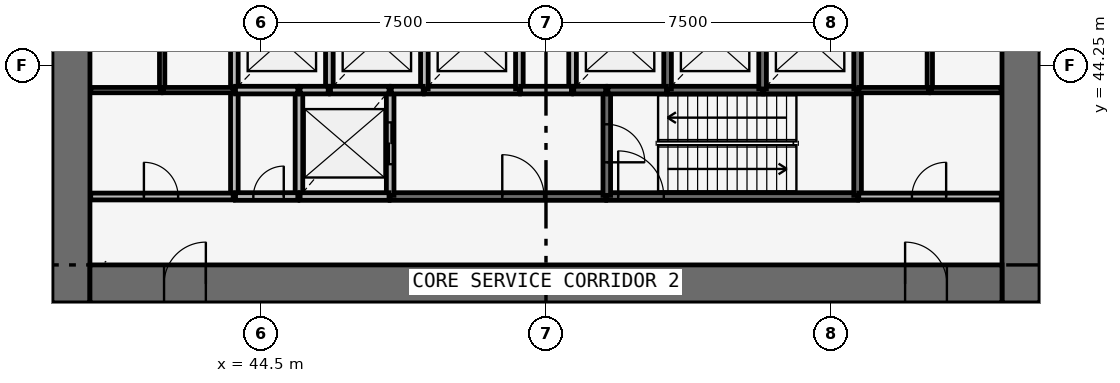
"""IFC4 building model, lengths in metres.
Left out: names, types, materials, properties, quantities, classifications, styles, units other than length and angle.
Written with IfcOpenShell. Run it as: python <this file> out.ifc"""

import sys

from ifc_helpers import new_model, si_unit, direction, frame, frame_2d, origin, place, context, subcontext, project, spatial, rectangle, extrude, source, transform, mapped, element, fill, save


model = new_model("IFC4")
c1 = context("Model", 3, precision=1e-05, world=origin(), true_north=direction((0.0, 1.0)))
c2 = subcontext(c1, "Body", "Model", "MODEL_VIEW")
j1 = project(units=[si_unit("LENGTHUNIT", "METRE"), si_unit("PLANEANGLEUNIT", "RADIAN")], contexts=[c1])
p1 = place(None, origin())
s1 = spatial("IfcSite", under=j1, at=p1, CompositionType="ELEMENT")
p2 = place(p1, origin())
s2 = spatial("IfcBuilding", under=s1, at=p2, CompositionType="ELEMENT")
p3 = place(p2, origin())
s3 = spatial("IfcBuildingStorey", under=s2, at=p3, CompositionType="ELEMENT", Elevation=0.0)
p4 = place(p3, frame((64.5, 38.0, -0.35), z_axis=(0.0, 0.0, 1.0), x_axis=(0.0, 1.0, 0.0)))
e1 = element("IfcWall", 1, at=p4, inside=s3, PredefinedType="SHEAR", context=c2, shape_type="SweptSolid", body=[
    extrude(rectangle(XDim=20.0, YDim=1.0, at=frame_2d((10.0, 0.0))), origin(), (0.0, 0.0, 1.0), 5.35),
])
p5 = place(p4, frame((9.1, 0.0, 0.35)))
e2 = element("IfcOpeningElement", 2, at=p5, cuts=e1, PredefinedType="OPENING", context=c2, shape_type="SweptSolid", body=[
    extrude(rectangle(XDim=1.8, YDim=2.1, at=frame_2d((0.9, 1.05))), frame((0.0, 0.51, 0.0), z_axis=(0.0, -1.0, 0.0), x_axis=(1.0, 0.0, 0.0)), (0.0, 0.0, 1.0), 1.02),
])
p6 = place(p3, frame((39.5, 58.0, -0.35), z_axis=(0.0, 0.0, 1.0), x_axis=(0.0, -1.0, 0.0)))
e3 = element("IfcWall", 3, at=p6, inside=s3, PredefinedType="SHEAR", context=c2, shape_type="SweptSolid", body=[
    extrude(rectangle(XDim=20.0, YDim=1.0, at=frame_2d((10.0, 0.0))), origin(), (0.0, 0.0, 1.0), 5.35),
])
p7 = place(p6, frame((9.1, 0.0, 0.35)))
e4 = element("IfcOpeningElement", 4, at=p7, cuts=e3, PredefinedType="OPENING", context=c2, shape_type="SweptSolid", body=[
    extrude(rectangle(XDim=1.8, YDim=2.1, at=frame_2d((0.9, 1.05))), frame((0.0, 0.51, 0.0), z_axis=(0.0, -1.0, 0.0), x_axis=(1.0, 0.0, 0.0)), (0.0, 0.0, 1.0), 1.02),
])
p8 = place(p3, frame((40.0, 38.5, -0.35), z_axis=(0.0, 0.0, 1.0), x_axis=(1.0, 0.0, 0.0)))
e5 = element("IfcWall", 5, at=p8, inside=s3, PredefinedType="SHEAR", context=c2, shape_type="SweptSolid", body=[
    extrude(rectangle(XDim=24.0, YDim=1.0, at=frame_2d((12.0, 0.0))), origin(), (0.0, 0.0, 1.0), 5.35),
])
p9 = place(p8, frame((21.45, 0.0, 0.35)))
e6 = element("IfcOpeningElement", 6, at=p9, cuts=e5, PredefinedType="OPENING", context=c2, shape_type="SweptSolid", body=[
    extrude(rectangle(XDim=1.1, YDim=2.1, at=frame_2d((0.55, 1.05))), frame((0.0, 0.51, 0.0), z_axis=(0.0, -1.0, 0.0), x_axis=(1.0, 0.0, 0.0)), (0.0, 0.0, 1.0), 1.02),
])
p10 = place(p8, frame((1.95, 0.0, 0.35)))
e7 = element("IfcOpeningElement", 7, at=p10, cuts=e5, PredefinedType="OPENING", context=c2, shape_type="SweptSolid", body=[
    extrude(rectangle(XDim=1.1, YDim=2.1, at=frame_2d((0.55, 1.05))), frame((0.0, 0.51, 0.0), z_axis=(0.0, -1.0, 0.0), x_axis=(1.0, 0.0, 0.0)), (0.0, 0.0, 1.0), 1.02),
])
p11 = place(p3, frame((53.6, 40.8, 0.0), z_axis=(0.0, 0.0, 1.0), x_axis=(1.0, 0.0, 0.0)))
e8 = element("IfcWall", 8, at=p11, inside=s3, PredefinedType="SOLIDWALL", context=c2, shape_type="SweptSolid", body=[
    extrude(rectangle(XDim=6.6, YDim=0.2, at=frame_2d((3.3, 0.0))), origin(), (0.0, 0.0, 1.0), 4.65),
])
p12 = place(p11, frame((0.3, 0.0, 0.0)))
e9 = element("IfcOpeningElement", 9, at=p12, cuts=e8, PredefinedType="OPENING", context=c2, shape_type="SweptSolid", body=[
    extrude(rectangle(XDim=1.2, YDim=2.1, at=frame_2d((0.6, 1.05))), frame((0.0, 0.11, 0.0), z_axis=(0.0, -1.0, 0.0), x_axis=(1.0, 0.0, 0.0)), (0.0, 0.0, 1.0), 0.22),
])
p13 = place(p3, frame((47.9, 40.8, 0.0), z_axis=(0.0, 0.0, 1.0), x_axis=(1.0, 0.0, 0.0)))
e10 = element("IfcWall", 10, at=p13, inside=s3, PredefinedType="SOLIDWALL", context=c2, shape_type="SweptSolid", body=[
    extrude(rectangle(XDim=5.67, YDim=0.2, at=frame_2d((2.835, 0.0))), origin(), (0.0, 0.0, 1.0), 4.65),
])
p14 = place(p13, frame((2.95, 0.0, 0.0)))
e11 = element("IfcOpeningElement", 11, at=p14, cuts=e10, PredefinedType="OPENING", context=c2, shape_type="SweptSolid", body=[
    extrude(rectangle(XDim=1.1, YDim=2.1, at=frame_2d((0.55, 1.05))), frame((0.0, 0.11, 0.0), z_axis=(0.0, -1.0, 0.0), x_axis=(1.0, 0.0, 0.0)), (0.0, 0.0, 1.0), 0.22),
])
for number, where, z_axis, x_axis in (
    (12, (43.8, 43.6, 0.0), (0.0, 0.0, 1.0), (0.0, -1.0, 0.0)),
    (13, (45.5, 43.6, 0.0), (0.0, 0.0, 1.0), (0.0, -1.0, 0.0)),
):
    element("IfcWall", number, at=place(p3, frame(where, z_axis=z_axis, x_axis=x_axis)), inside=s3, PredefinedType="SOLIDWALL", context=c2, shape_type="SweptSolid", body=[
        extrude(rectangle(XDim=2.8, YDim=0.2, at=frame_2d((1.4, 0.0))), origin(), (0.0, 0.0, 1.0), 4.65),
    ])
p15 = place(p3, frame((47.9, 40.83, 0.0), z_axis=(0.0, 0.0, 1.0), x_axis=(0.0, 1.0, 0.0)))
e14 = element("IfcWall", 14, at=p15, inside=s3, PredefinedType="SOLIDWALL", context=c2, shape_type="SweptSolid", body=[
    extrude(rectangle(XDim=2.77, YDim=0.2, at=frame_2d((1.385, 0.0))), origin(), (0.0, 0.0, 1.0), 4.65),
])
p16 = place(p15, frame((0.82, 0.0, 0.0)))
e15 = element("IfcOpeningElement", 15, at=p16, cuts=e14, PredefinedType="OPENING", context=c2, shape_type="SweptSolid", body=[
    extrude(rectangle(XDim=1.1, YDim=2.1, at=frame_2d((0.55, 1.05))), frame((0.0, 0.11, 0.0), z_axis=(0.0, -1.0, 0.0), x_axis=(1.0, 0.0, 0.0)), (0.0, 0.0, 1.0), 0.22),
])
p17 = place(p3, frame((60.2, 40.83, 0.0), z_axis=(0.0, 0.0, 1.0), x_axis=(0.0, 1.0, 0.0)))
e16 = element("IfcWall", 16, at=p17, inside=s3, PredefinedType="SOLIDWALL", context=c2, shape_type="SweptSolid", body=[
    extrude(rectangle(XDim=2.77, YDim=0.2, at=frame_2d((1.385, 0.0))), origin(), (0.0, 0.0, 1.0), 4.65),
])
p18 = place(p3, frame((53.6, 43.6, 0.0), z_axis=(0.0, 0.0, 1.0), x_axis=(0.0, -1.0, 0.0)))
e17 = element("IfcWall", 17, at=p18, inside=s3, PredefinedType="SOLIDWALL", context=c2, shape_type="SweptSolid", body=[
    extrude(rectangle(XDim=2.77, YDim=0.2, at=frame_2d((1.385, 0.0))), origin(), (0.0, 0.0, 1.0), 4.65),
])
p19 = place(p18, frame((0.9, 0.0, 0.0)))
e18 = element("IfcOpeningElement", 18, at=p19, cuts=e17, PredefinedType="OPENING", context=c2, shape_type="SweptSolid", body=[
    extrude(rectangle(XDim=1.0, YDim=2.1, at=frame_2d((0.5, 1.05))), frame((0.0, 0.11, 0.0), z_axis=(0.0, -1.0, 0.0), x_axis=(1.0, 0.0, 0.0)), (0.0, 0.0, 1.0), 0.22),
])
for number, where, z_axis, x_axis in (
    (19, (48.8, 43.6, 0.0), (0.0, 0.0, 1.0), (1.0, 0.0, 0.0)),
    (20, (55.2, 43.6, 0.0), (0.0, 0.0, 1.0), (1.0, 0.0, 0.0)),
):
    element("IfcWall", number, at=place(p3, frame(where, z_axis=z_axis, x_axis=x_axis)), inside=s3, PredefinedType="SOLIDWALL", context=c2, shape_type="SweptSolid", body=[
        extrude(rectangle(XDim=2.5, YDim=0.2, at=frame_2d((1.25, 0.0))), origin(), (0.0, 0.0, 1.0), 4.65),
    ])
p20 = place(p3, frame((57.73, 43.6, 0.0), z_axis=(0.0, 0.0, 1.0), x_axis=(1.0, 0.0, 0.0)))
e21 = element("IfcWall", 21, at=p20, inside=s3, PredefinedType="SOLIDWALL", context=c2, shape_type="SweptSolid", body=[
    extrude(rectangle(XDim=2.44, YDim=0.2, at=frame_2d((1.22, 0.0))), origin(), (0.0, 0.0, 1.0), 4.65),
])
p21 = place(p3, frame((45.53, 40.8, 0.0), z_axis=(0.0, 0.0, 1.0), x_axis=(1.0, 0.0, 0.0)))
e22 = element("IfcWall", 22, at=p21, inside=s3, PredefinedType="SOLIDWALL", context=c2, shape_type="SweptSolid", body=[
    extrude(rectangle(XDim=2.34, YDim=0.2, at=frame_2d((1.17, 0.0))), origin(), (0.0, 0.0, 1.0), 4.65),
])
p22 = place(p3, frame((43.8, 45.99, 0.0), z_axis=(0.0, 0.0, 1.0), x_axis=(0.0, -1.0, 0.0)))
e23 = element("IfcWall", 23, at=p22, inside=s3, PredefinedType="SOLIDWALL", context=c2, shape_type="SweptSolid", body=[
    extrude(rectangle(XDim=2.36, YDim=0.2, at=frame_2d((1.18, 0.0))), origin(), (0.0, 0.0, 1.0), 4.65),
])
p23 = place(p3, frame((46.3, 43.6, 0.0), z_axis=(0.0, 0.0, 1.0), x_axis=(0.0, 1.0, 0.0)))
e24 = element("IfcWall", 24, at=p23, inside=s3, PredefinedType="SOLIDWALL", context=c2, shape_type="SweptSolid", body=[
    extrude(rectangle(XDim=2.39, YDim=0.2, at=frame_2d((1.195, 0.0))), origin(), (0.0, 0.0, 1.0), 4.65),
])
for number, where, z_axis, x_axis in (
    (25, (48.8, 43.63, 0.0), (0.0, 0.0, 1.0), (0.0, 1.0, 0.0)),
    (26, (51.3, 43.63, 0.0), (0.0, 0.0, 1.0), (0.0, 1.0, 0.0)),
):
    element("IfcWall", number, at=place(p3, frame(where, z_axis=z_axis, x_axis=x_axis)), inside=s3, PredefinedType="SOLIDWALL", context=c2, shape_type="SweptSolid", body=[
        extrude(rectangle(XDim=2.36, YDim=0.2, at=frame_2d((1.18, 0.0))), origin(), (0.0, 0.0, 1.0), 4.65),
    ])
p24 = place(p3, frame((52.7, 45.99, 0.0), z_axis=(0.0, 0.0, 1.0), x_axis=(0.0, -1.0, 0.0)))
e27 = element("IfcWall", 27, at=p24, inside=s3, PredefinedType="SOLIDWALL", context=c2, shape_type="SweptSolid", body=[
    extrude(rectangle(XDim=2.39, YDim=0.2, at=frame_2d((1.195, 0.0))), origin(), (0.0, 0.0, 1.0), 4.65),
])
for number, where, z_axis, x_axis in (
    (28, (55.2, 43.63, 0.0), (0.0, 0.0, 1.0), (0.0, 1.0, 0.0)),
    (29, (57.7, 43.63, 0.0), (0.0, 0.0, 1.0), (0.0, 1.0, 0.0)),
    (30, (60.2, 43.63, 0.0), (0.0, 0.0, 1.0), (0.0, 1.0, 0.0)),
):
    element("IfcWall", number, at=place(p3, frame(where, z_axis=z_axis, x_axis=x_axis)), inside=s3, PredefinedType="SOLIDWALL", context=c2, shape_type="SweptSolid", body=[
        extrude(rectangle(XDim=2.36, YDim=0.2, at=frame_2d((1.18, 0.0))), origin(), (0.0, 0.0, 1.0), 4.65),
    ])
p25 = place(p3, frame((43.83, 43.6, 0.0), z_axis=(0.0, 0.0, 1.0), x_axis=(1.0, 0.0, 0.0)))
e31 = element("IfcWall", 31, at=p25, inside=s3, PredefinedType="SOLIDWALL", context=c2, shape_type="SweptSolid", body=[
    extrude(rectangle(XDim=1.64, YDim=0.2, at=frame_2d((0.82, 0.0))), origin(), (0.0, 0.0, 1.0), 4.65),
])
p26 = place(p3, frame((43.83, 40.8, 0.0), z_axis=(0.0, 0.0, 1.0), x_axis=(1.0, 0.0, 0.0)))
e32 = element("IfcWall", 32, at=p26, inside=s3, PredefinedType="SOLIDWALL", context=c2, shape_type="SweptSolid", body=[
    extrude(rectangle(XDim=1.64, YDim=0.2, at=frame_2d((0.82, 0.0))), origin(), (0.0, 0.0, 1.0), 4.65),
])
p27 = place(p26, frame((0.47, 0.0, 0.0)))
e33 = element("IfcOpeningElement", 33, at=p27, cuts=e32, PredefinedType="OPENING", context=c2, shape_type="SweptSolid", body=[
    extrude(rectangle(XDim=0.8, YDim=2.1, at=frame_2d((0.4, 1.05))), frame((0.0, 0.11, 0.0), z_axis=(0.0, -1.0, 0.0), x_axis=(1.0, 0.0, 0.0)), (0.0, 0.0, 1.0), 0.22),
])
for number, where, z_axis, x_axis in (
    (34, (46.33, 43.6, 0.0), (0.0, 0.0, 1.0), (1.0, 0.0, 0.0)),
    (35, (53.63, 43.6, 0.0), (0.0, 0.0, 1.0), (1.0, 0.0, 0.0)),
):
    element("IfcWall", number, at=place(p3, frame(where, z_axis=z_axis, x_axis=x_axis)), inside=s3, PredefinedType="SOLIDWALL", context=c2, shape_type="SweptSolid", body=[
        extrude(rectangle(XDim=1.54, YDim=0.2, at=frame_2d((0.77, 0.0))), origin(), (0.0, 0.0, 1.0), 4.65),
    ])
p28 = place(p3, frame((52.67, 43.6, 0.0), z_axis=(0.0, 0.0, 1.0), x_axis=(-1.0, 0.0, 0.0)))
e36 = element("IfcWall", 36, at=p28, inside=s3, PredefinedType="SOLIDWALL", context=c2, shape_type="SweptSolid", body=[
    extrude(rectangle(XDim=1.34, YDim=0.2, at=frame_2d((0.67, 0.0))), origin(), (0.0, 0.0, 1.0), 4.65),
])
for number, where, z_axis, x_axis in (
    (37, (47.93, 43.6, 0.0), (0.0, 0.0, 1.0), (1.0, 0.0, 0.0)),
    (38, (52.73, 43.6, 0.0), (0.0, 0.0, 1.0), (1.0, 0.0, 0.0)),
):
    element("IfcWall", number, at=place(p3, frame(where, z_axis=z_axis, x_axis=x_axis)), inside=s3, PredefinedType="SOLIDWALL", context=c2, shape_type="SweptSolid", body=[
        extrude(rectangle(XDim=0.84, YDim=0.2, at=frame_2d((0.42, 0.0))), origin(), (0.0, 0.0, 1.0), 4.65),
    ])
p29 = place(p3, frame((45.53, 43.6, 0.0), z_axis=(0.0, 0.0, 1.0), x_axis=(1.0, 0.0, 0.0)))
e39 = element("IfcWall", 39, at=p29, inside=s3, PredefinedType="SOLIDWALL", context=c2, shape_type="SweptSolid", body=[
    extrude(rectangle(XDim=0.74, YDim=0.2, at=frame_2d((0.37, 0.0))), origin(), (0.0, 0.0, 1.0), 4.65),
])
p30 = place(p3, frame((40.02, 40.8, 0.0), z_axis=(0.0, 0.0, 1.0), x_axis=(1.0, 0.0, 0.0)))
e40 = element("IfcWall", 40, at=p30, inside=s3, PredefinedType="PARTITIONING", context=c2, shape_type="SweptSolid", body=[
    extrude(rectangle(XDim=3.75, YDim=0.18, at=frame_2d((1.875, 0.0))), origin(), (0.0, 0.0, 1.0), 4.65),
])
p31 = place(p30, frame((1.4, 0.0, 0.0)))
e41 = element("IfcOpeningElement", 41, at=p31, cuts=e40, PredefinedType="OPENING", context=c2, shape_type="SweptSolid", body=[
    extrude(rectangle(XDim=0.9, YDim=2.1, at=frame_2d((0.45, 1.05))), frame((0.0, 0.1, 0.0), z_axis=(0.0, -1.0, 0.0), x_axis=(1.0, 0.0, 0.0)), (0.0, 0.0, 1.0), 0.2),
])
p32 = place(p3, frame((60.23, 40.8, 0.0), z_axis=(0.0, 0.0, 1.0), x_axis=(1.0, 0.0, 0.0)))
e42 = element("IfcWall", 42, at=p32, inside=s3, PredefinedType="PARTITIONING", context=c2, shape_type="SweptSolid", body=[
    extrude(rectangle(XDim=3.75, YDim=0.18, at=frame_2d((1.875, 0.0))), origin(), (0.0, 0.0, 1.0), 4.65),
])
p33 = place(p32, frame((1.4, 0.0, 0.0)))
e43 = element("IfcOpeningElement", 43, at=p33, cuts=e42, PredefinedType="OPENING", context=c2, shape_type="SweptSolid", body=[
    extrude(rectangle(XDim=0.9, YDim=2.1, at=frame_2d((0.45, 1.05))), frame((0.0, 0.1, 0.0), z_axis=(0.0, -1.0, 0.0), x_axis=(1.0, 0.0, 0.0)), (0.0, 0.0, 1.0), 0.2),
])
for number, where, z_axis, x_axis in (
    (44, (41.9, 43.6, 0.0), (0.0, 0.0, 1.0), (0.0, 1.0, 0.0)),
    (45, (62.1, 43.6, 0.0), (0.0, 0.0, 1.0), (0.0, 1.0, 0.0)),
):
    element("IfcWall", number, at=place(p3, frame(where, z_axis=z_axis, x_axis=x_axis)), inside=s3, PredefinedType="PARTITIONING", context=c2, shape_type="SweptSolid", body=[
        extrude(rectangle(XDim=2.39, YDim=0.14, at=frame_2d((1.195, 0.0))), origin(), (0.0, 0.0, 1.0), 3.85),
    ])
for number, where, z_axis, x_axis in (
    (46, (43.77, 43.6, 0.0), (0.0, 0.0, 1.0), (-1.0, 0.0, 0.0)),
    (47, (60.23, 43.6, 0.0), (0.0, 0.0, 1.0), (1.0, 0.0, 0.0)),
):
    element("IfcWall", number, at=place(p3, frame(where, z_axis=z_axis, x_axis=x_axis)), inside=s3, PredefinedType="PARTITIONING", context=c2, shape_type="SweptSolid", body=[
        extrude(rectangle(XDim=1.84, YDim=0.14, at=frame_2d((0.92, 0.0))), origin(), (0.0, 0.0, 1.0), 3.85),
    ])
for number, where, z_axis, x_axis in (
    (48, (41.87, 43.6, 0.0), (0.0, 0.0, 1.0), (-1.0, 0.0, 0.0)),
    (49, (62.13, 43.6, 0.0), (0.0, 0.0, 1.0), (1.0, 0.0, 0.0)),
):
    element("IfcWall", number, at=place(p3, frame(where, z_axis=z_axis, x_axis=x_axis)), inside=s3, PredefinedType="PARTITIONING", context=c2, shape_type="SweptSolid", body=[
        extrude(rectangle(XDim=1.85, YDim=0.14, at=frame_2d((0.925, 0.0))), origin(), (0.0, 0.0, 1.0), 3.85),
    ])
m1 = source(origin(), c2, "Body", "SweptSolid", [
    extrude(rectangle(XDim=1.1, YDim=2.1, at=frame_2d((0.55, 1.05))), frame((0.0, 0.025, 0.0), z_axis=(0.0, -1.0, 0.0), x_axis=(1.0, 0.0, 0.0)), (0.0, 0.0, 1.0), 0.05),
])
p34 = place(p16, origin())
e50 = element("IfcDoor", 50, at=p34, inside=s3, OperationType="DOUBLE_DOOR_SLIDING", PredefinedType="USERDEFINED", context=c2, shape_type="MappedRepresentation", body=[
    mapped(m1, transform((0.0, 0.0, 0.0), scale=1.0)),
])
fill(e15, e50)
m2 = source(origin(), c2, "Body", "SweptSolid", [
    extrude(rectangle(XDim=1.2, YDim=2.1, at=frame_2d((0.6, 1.05))), frame((0.0, 0.025, 0.0), z_axis=(0.0, -1.0, 0.0), x_axis=(1.0, 0.0, 0.0)), (0.0, 0.0, 1.0), 0.05),
])
p35 = place(p12, origin())
e51 = element("IfcDoor", 51, at=p35, inside=s3, OperationType="SINGLE_SWING_LEFT", PredefinedType="DOOR", context=c2, shape_type="MappedRepresentation", body=[
    mapped(m2, transform((0.0, 0.0, 0.0), scale=1.0)),
])
fill(e9, e51)
m3 = source(origin(), c2, "Body", "SweptSolid", [
    extrude(rectangle(XDim=1.0, YDim=2.1, at=frame_2d((0.5, 1.05))), frame((0.0, 0.025, 0.0), z_axis=(0.0, -1.0, 0.0), x_axis=(1.0, 0.0, 0.0)), (0.0, 0.0, 1.0), 0.05),
])
p36 = place(p19, origin())
e52 = element("IfcDoor", 52, at=p36, inside=s3, OperationType="SINGLE_SWING_RIGHT", PredefinedType="DOOR", context=c2, shape_type="MappedRepresentation", body=[
    mapped(m3, transform((0.0, 0.0, 0.0), scale=1.0)),
])
fill(e18, e52)
m4 = source(origin(), c2, "Body", "SweptSolid", [
    extrude(rectangle(XDim=1.1, YDim=2.1, at=frame_2d((0.55, 1.05))), frame((0.0, 0.025, 0.0), z_axis=(0.0, -1.0, 0.0), x_axis=(1.0, 0.0, 0.0)), (0.0, 0.0, 1.0), 0.05),
])
p37 = place(p14, origin())
e53 = element("IfcDoor", 53, at=p37, inside=s3, OperationType="SINGLE_SWING_LEFT", PredefinedType="DOOR", context=c2, shape_type="MappedRepresentation", body=[
    mapped(m4, transform((0.0, 0.0, 0.0), scale=1.0)),
])
fill(e11, e53)
m5 = source(origin(), c2, "Body", "SweptSolid", [
    extrude(rectangle(XDim=0.8, YDim=2.1, at=frame_2d((0.4, 1.05))), frame((0.0, 0.025, 0.0), z_axis=(0.0, -1.0, 0.0), x_axis=(1.0, 0.0, 0.0)), (0.0, 0.0, 1.0), 0.05),
])
p38 = place(p27, origin())
e54 = element("IfcDoor", 54, at=p38, inside=s3, OperationType="SINGLE_SWING_RIGHT", PredefinedType="DOOR", context=c2, shape_type="MappedRepresentation", body=[
    mapped(m5, transform((0.0, 0.0, 0.0), scale=1.0)),
])
fill(e33, e54)
m6 = source(origin(), c2, "Body", "SweptSolid", [
    extrude(rectangle(XDim=1.1, YDim=2.1, at=frame_2d((0.55, 1.05))), frame((0.0, 0.025, 0.0), z_axis=(0.0, -1.0, 0.0), x_axis=(1.0, 0.0, 0.0)), (0.0, 0.0, 1.0), 0.05),
])
p39 = place(p9, origin())
e55 = element("IfcDoor", 55, at=p39, inside=s3, OperationType="SINGLE_SWING_LEFT", PredefinedType="DOOR", context=c2, shape_type="MappedRepresentation", body=[
    mapped(m6, transform((0.0, 0.0, 0.0), scale=1.0)),
])
fill(e6, e55)
p40 = place(p10, origin())
e56 = element("IfcDoor", 56, at=p40, inside=s3, OperationType="SINGLE_SWING_RIGHT", PredefinedType="DOOR", context=c2, shape_type="MappedRepresentation", body=[
    mapped(m6, transform((0.0, 0.0, 0.0), scale=1.0)),
])
fill(e7, e56)
m7 = source(origin(), c2, "Body", "SweptSolid", [
    extrude(rectangle(XDim=0.9, YDim=2.1, at=frame_2d((0.45, 1.05))), frame((0.0, 0.025, 0.0), z_axis=(0.0, -1.0, 0.0), x_axis=(1.0, 0.0, 0.0)), (0.0, 0.0, 1.0), 0.05),
])
p41 = place(p31, origin())
e57 = element("IfcDoor", 57, at=p41, inside=s3, OperationType="SINGLE_SWING_LEFT", PredefinedType="DOOR", context=c2, shape_type="MappedRepresentation", body=[
    mapped(m7, transform((0.0, 0.0, 0.0), scale=1.0)),
])
fill(e41, e57)
p42 = place(p33, origin())
e58 = element("IfcDoor", 58, at=p42, inside=s3, OperationType="SINGLE_SWING_RIGHT", PredefinedType="DOOR", context=c2, shape_type="MappedRepresentation", body=[
    mapped(m7, transform((0.0, 0.0, 0.0), scale=1.0)),
])
fill(e43, e58)
save(model, sys.argv[1])
